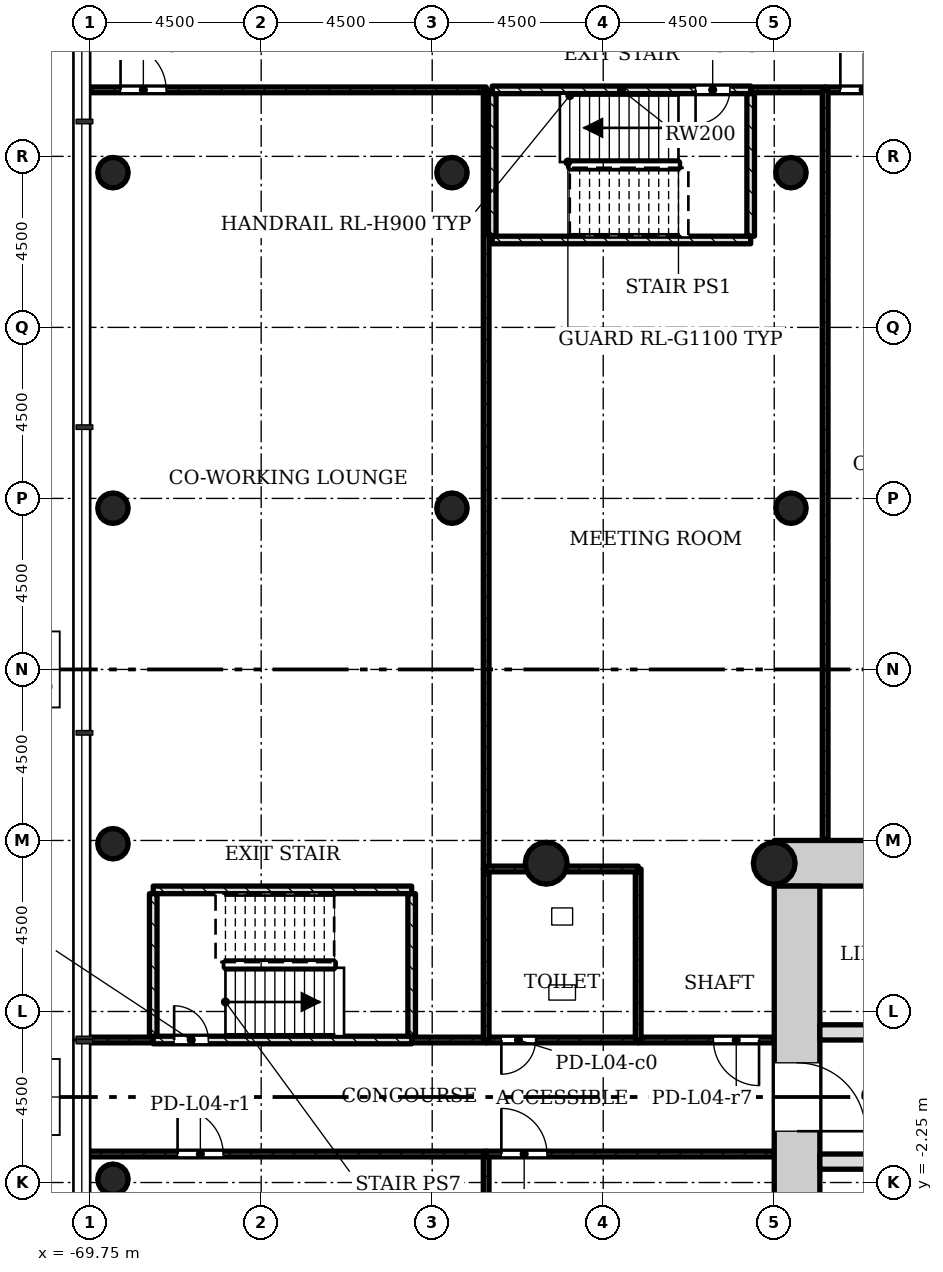
"""IFC4 building model, lengths in metres.
Left out: names, types, materials, properties, quantities, classifications, styles, units other than length and angle.
Written with IfcOpenShell. Run it as: python <this file> out.ifc"""

import sys

from ifc_helpers import new_model, si_unit, direction, frame, frame_2d, origin, origin_2d, place, context, subcontext, project, spatial, rectangle, hollow_circle, extrude, element, fill, save


model = new_model("IFC4")
c1 = context("Model", 3, precision=1e-05, world=origin(), true_north=direction((0.0, 1.0)))
c2 = subcontext(c1, "Body", "Model", "MODEL_VIEW")
j1 = project(units=[si_unit("LENGTHUNIT", "METRE"), si_unit("PLANEANGLEUNIT", "RADIAN")], contexts=[c1])
p1 = place(None, origin())
s1 = spatial("IfcSite", under=j1, at=p1, CompositionType="ELEMENT")
p2 = place(p1, origin())
s2 = spatial("IfcBuilding", under=s1, at=p2, CompositionType="ELEMENT")
p3 = place(p2, frame((0.0, 0.0, 20.0)))
s3 = spatial("IfcBuildingStorey", under=s2, at=p3, CompositionType="ELEMENT", Elevation=20.0)
p4 = place(p3, frame((-43.95, 6.15, 0.0), z_axis=(0.0, 0.0, 1.0), x_axis=(-1.0, 0.0, 0.0)))
e1 = element("IfcWall", 1, at=p4, inside=s3, PredefinedType="SHEAR", context=c2, shape_type="SweptSolid", body=[
    extrude(rectangle(XDim=7.8, YDim=1.2, at=frame_2d((3.9, 0.0))), origin(), (0.0, 0.0, 1.0), 4.5),
])
p5 = place(p3, frame((-51.15, 5.55, 0.0), z_axis=(0.0, 0.0, 1.0), x_axis=(0.0, -1.0, 0.0)))
e2 = element("IfcWall", 2, at=p5, inside=s3, PredefinedType="SHEAR", context=c2, shape_type="SweptSolid", body=[
    extrude(rectangle(XDim=12.3, YDim=1.2, at=frame_2d((6.15, 0.0))), origin(), (0.0, 0.0, 1.0), 4.5),
])
p6 = place(p5, frame((4.65, 0.0, 0.0)))
e3 = element("IfcOpeningElement", 3, at=p6, cuts=e2, PredefinedType="OPENING", context=c2, shape_type="SweptSolid", body=[
    extrude(rectangle(XDim=1.8, YDim=2.1, at=frame_2d((0.9, 1.05))), frame((0.0, 0.61, 0.0), z_axis=(0.0, -1.0, 0.0), x_axis=(1.0, 0.0, 0.0)), (0.0, 0.0, 1.0), 1.22),
])
p7 = place(p3, frame((-50.55, -1.7, 0.0), z_axis=(0.0, 0.0, 1.0), x_axis=(1.0, 0.0, 0.0)))
e4 = element("IfcWall", 4, at=p7, inside=s3, PredefinedType="SHEAR", context=c2, shape_type="SweptSolid", body=[
    extrude(rectangle(XDim=6.6, YDim=0.4, at=frame_2d((3.3, 0.0))), origin(), (0.0, 0.0, 1.0), 4.5),
])
p8 = place(p7, frame((5.25, 0.0, 0.0)))
e5 = element("IfcOpeningElement", 5, at=p8, cuts=e4, PredefinedType="OPENING", context=c2, shape_type="SweptSolid", body=[
    extrude(rectangle(XDim=0.9, YDim=2.1, at=frame_2d((0.45, 1.05))), frame((0.0, 0.21, 0.0), z_axis=(0.0, -1.0, 0.0), x_axis=(1.0, 0.0, 0.0)), (0.0, 0.0, 1.0), 0.42),
])
p9 = place(p3, frame((-50.55, 1.7, 0.0), z_axis=(0.0, 0.0, 1.0), x_axis=(1.0, 0.0, 0.0)))
e6 = element("IfcWall", 6, at=p9, inside=s3, PredefinedType="SHEAR", context=c2, shape_type="SweptSolid", body=[
    extrude(rectangle(XDim=6.6, YDim=0.4, at=frame_2d((3.3, 0.0))), origin(), (0.0, 0.0, 1.0), 4.5),
])
p10 = place(p9, frame((4.95, 0.0, 0.0)))
e7 = element("IfcOpeningElement", 7, at=p10, cuts=e6, PredefinedType="OPENING", context=c2, shape_type="SweptSolid", body=[
    extrude(rectangle(XDim=1.1, YDim=2.1, at=frame_2d((0.55, 1.05))), frame((0.0, 0.21, 0.0), z_axis=(0.0, -1.0, 0.0), x_axis=(1.0, 0.0, 0.0)), (0.0, 0.0, 1.0), 0.42),
])
for number, where, z_axis, x_axis in (
    (8, (-51.75, 6.15, 0.0), (0.0, 0.0, 1.0), (1.0, 0.0, 0.0)),
    (9, (-57.75, 6.15, 0.0), (0.0, 0.0, 1.0), (1.0, 0.0, 0.0)),
):
    element("IfcColumn", number, at=place(p3, frame(where, z_axis=z_axis, x_axis=x_axis)), inside=s3, PredefinedType="COLUMN", context=c2, shape_type="SweptSolid", body=[
        extrude(hollow_circle(Radius=0.55, WallThickness=0.04, at=origin_2d()), origin(), (0.0, 0.0, 1.0), 4.5),
    ])
for number, where, z_axis, x_axis in (
    (10, (-69.15, -2.164, 0.0), (0.0, 0.0, 1.0), (1.0, 0.0, 0.0)),
    (11, (-69.15, 6.664, 0.0), (0.0, 0.0, 1.0), (1.0, 0.0, 0.0)),
    (12, (-69.15, 15.493, 0.0), (0.0, 0.0, 1.0), (1.0, 0.0, 0.0)),
    (13, (-60.23, 15.493, 0.0), (0.0, 0.0, 1.0), (1.0, 0.0, 0.0)),
    (14, (-51.31, 15.493, 0.0), (0.0, 0.0, 1.0), (1.0, 0.0, 0.0)),
    (15, (-69.15, 24.321, 0.0), (0.0, 0.0, 1.0), (1.0, 0.0, 0.0)),
    (16, (-60.23, 24.321, 0.0), (0.0, 0.0, 1.0), (1.0, 0.0, 0.0)),
    (17, (-51.31, 24.321, 0.0), (0.0, 0.0, 1.0), (1.0, 0.0, 0.0)),
):
    element("IfcColumn", number, at=place(p3, frame(where, z_axis=z_axis, x_axis=x_axis)), inside=s3, PredefinedType="COLUMN", context=c2, shape_type="SweptSolid", body=[
        extrude(hollow_circle(Radius=0.4, WallThickness=0.028, at=origin_2d()), origin(), (0.0, 0.0, 1.0), 4.08),
    ])
p11 = place(p3, frame((-69.85, -1.5, 0.0), z_axis=(0.0, 0.0, 1.0), x_axis=(1.0, 0.0, 0.0)))
e18 = element("IfcWall", 18, at=p11, inside=s3, PredefinedType="PARTITIONING", context=c2, shape_type="SweptSolid", body=[
    extrude(rectangle(XDim=10.52, YDim=0.15, at=frame_2d((5.26, 0.0))), origin(), (0.0, 0.0, 1.0), 4.075),
])
p12 = place(p11, frame((2.4, 0.0, 0.0)))
e19 = element("IfcOpeningElement", 19, at=p12, cuts=e18, PredefinedType="OPENING", context=c2, shape_type="SweptSolid", body=[
    extrude(rectangle(XDim=1.2, YDim=2.1, at=frame_2d((0.6, 1.05))), frame((0.0, 0.085, 0.0), z_axis=(0.0, -1.0, 0.0), x_axis=(1.0, 0.0, 0.0)), (0.0, 0.0, 1.0), 0.17),
])
p13 = place(p3, frame((-59.33, -1.5, 0.0), z_axis=(0.0, 0.0, 1.0), x_axis=(0.0, -1.0, 0.0)))
e20 = element("IfcWall", 20, at=p13, inside=s3, PredefinedType="PARTITIONING", context=c2, shape_type="SweptSolid", body=[
    extrude(rectangle(XDim=22.0, YDim=0.15, at=frame_2d((11.0, 0.0))), origin(), (0.0, 0.0, 1.0), 4.075),
])
p14 = place(p3, frame((-59.33, 1.5, 0.0), z_axis=(0.0, 0.0, 1.0), x_axis=(-1.0, 0.0, 0.0)))
e21 = element("IfcWall", 21, at=p14, inside=s3, PredefinedType="PARTITIONING", context=c2, shape_type="SweptSolid", body=[
    extrude(rectangle(XDim=1.96, YDim=0.15, at=frame_2d((0.98, 0.0))), origin(), (0.0, 0.0, 1.0), 4.075),
])
p15 = place(p3, frame((-68.09, 1.5, 0.0), z_axis=(0.0, 0.0, 1.0), x_axis=(-1.0, 0.0, 0.0)))
e22 = element("IfcWall", 22, at=p15, inside=s3, PredefinedType="PARTITIONING", context=c2, shape_type="SweptSolid", body=[
    extrude(rectangle(XDim=1.76, YDim=0.15, at=frame_2d((0.88, 0.0))), origin(), (0.0, 0.0, 1.0), 4.075),
])
p16 = place(p3, frame((-69.85, 26.5, 0.0), z_axis=(0.0, 0.0, 1.0), x_axis=(1.0, 0.0, 0.0)))
e23 = element("IfcWall", 23, at=p16, inside=s3, PredefinedType="PARTITIONING", context=c2, shape_type="SweptSolid", body=[
    extrude(rectangle(XDim=10.52, YDim=0.15, at=frame_2d((5.26, 0.0))), origin(), (0.0, 0.0, 1.0), 4.075),
])
p17 = place(p16, frame((0.9, 0.0, 0.0)))
e24 = element("IfcOpeningElement", 24, at=p17, cuts=e23, PredefinedType="OPENING", context=c2, shape_type="SweptSolid", body=[
    extrude(rectangle(XDim=1.2, YDim=2.1, at=frame_2d((0.6, 1.05))), frame((0.0, 0.085, 0.0), z_axis=(0.0, -1.0, 0.0), x_axis=(1.0, 0.0, 0.0)), (0.0, 0.0, 1.0), 0.17),
])
p18 = place(p3, frame((-59.33, 26.5, 0.0), z_axis=(0.0, 0.0, 1.0), x_axis=(0.0, -1.0, 0.0)))
e25 = element("IfcWall", 25, at=p18, inside=s3, PredefinedType="PARTITIONING", context=c2, shape_type="SweptSolid", body=[
    extrude(rectangle(XDim=20.5, YDim=0.15, at=frame_2d((10.25, 0.0))), origin(), (0.0, 0.0, 1.0), 4.075),
])
p19 = place(p3, frame((-59.33, -1.5, 0.0), z_axis=(0.0, 0.0, 1.0), x_axis=(1.0, 0.0, 0.0)))
e26 = element("IfcWall", 26, at=p19, inside=s3, PredefinedType="PARTITIONING", context=c2, shape_type="SweptSolid", body=[
    extrude(rectangle(XDim=7.58, YDim=0.15, at=frame_2d((3.79, 0.0))), origin(), (0.0, 0.0, 1.0), 4.075),
])
p20 = place(p19, frame((0.4, 0.0, 0.0)))
e27 = element("IfcOpeningElement", 27, at=p20, cuts=e26, PredefinedType="OPENING", context=c2, shape_type="SweptSolid", body=[
    extrude(rectangle(XDim=1.2, YDim=2.1, at=frame_2d((0.6, 1.05))), frame((0.0, 0.085, 0.0), z_axis=(0.0, -1.0, 0.0), x_axis=(1.0, 0.0, 0.0)), (0.0, 0.0, 1.0), 0.17),
])
p21 = place(p3, frame((-51.75, 1.5, 0.0), z_axis=(0.0, 0.0, 1.0), x_axis=(-1.0, 0.0, 0.0)))
e28 = element("IfcWall", 28, at=p21, inside=s3, PredefinedType="PARTITIONING", context=c2, shape_type="SweptSolid", body=[
    extrude(rectangle(XDim=3.58, YDim=0.15, at=frame_2d((1.79, 0.0))), origin(), (0.0, 0.0, 1.0), 4.075),
])
p22 = place(p21, frame((0.4, 0.0, 0.0)))
e29 = element("IfcOpeningElement", 29, at=p22, cuts=e28, PredefinedType="OPENING", context=c2, shape_type="SweptSolid", body=[
    extrude(rectangle(XDim=1.2, YDim=2.1, at=frame_2d((0.6, 1.05))), frame((0.0, 0.085, 0.0), z_axis=(0.0, -1.0, 0.0), x_axis=(1.0, 0.0, 0.0)), (0.0, 0.0, 1.0), 0.17),
])
p23 = place(p3, frame((-52.37, 26.5, 0.0), z_axis=(0.0, 0.0, 1.0), x_axis=(1.0, 0.0, 0.0)))
e30 = element("IfcWall", 30, at=p23, inside=s3, PredefinedType="PARTITIONING", context=c2, shape_type="SweptSolid", body=[
    extrude(rectangle(XDim=1.96, YDim=0.15, at=frame_2d((0.98, 0.0))), origin(), (0.0, 0.0, 1.0), 4.075),
])
p24 = place(p3, frame((-50.41, 26.5, 0.0), z_axis=(0.0, 0.0, 1.0), x_axis=(1.0, 0.0, 0.0)))
e31 = element("IfcWall", 31, at=p24, inside=s3, PredefinedType="PARTITIONING", context=c2, shape_type="SweptSolid", body=[
    extrude(rectangle(XDim=8.92, YDim=0.15, at=frame_2d((4.46, 0.0))), origin(), (0.0, 0.0, 1.0), 4.075),
])
p25 = place(p24, frame((0.4, 0.0, 0.0)))
e32 = element("IfcOpeningElement", 32, at=p25, cuts=e31, PredefinedType="OPENING", context=c2, shape_type="SweptSolid", body=[
    extrude(rectangle(XDim=1.2, YDim=2.1, at=frame_2d((0.6, 1.05))), frame((0.0, 0.085, 0.0), z_axis=(0.0, -1.0, 0.0), x_axis=(1.0, 0.0, 0.0)), (0.0, 0.0, 1.0), 0.17),
])
p26 = place(p3, frame((-50.41, 6.75, 0.0), z_axis=(0.0, 0.0, 1.0), x_axis=(0.0, 1.0, 0.0)))
e33 = element("IfcWall", 33, at=p26, inside=s3, PredefinedType="PARTITIONING", context=c2, shape_type="SweptSolid", body=[
    extrude(rectangle(XDim=19.75, YDim=0.15, at=frame_2d((9.875, 0.0))), origin(), (0.0, 0.0, 1.0), 4.075),
])
p27 = place(p3, frame((-59.33, 1.5, 0.0), z_axis=(0.0, 0.0, 1.0), x_axis=(1.0, 0.0, 0.0)))
e34 = element("IfcWall", 34, at=p27, inside=s3, PredefinedType="PARTITIONING", context=c2, shape_type="SweptSolid", body=[
    extrude(rectangle(XDim=4.0, YDim=0.15, at=frame_2d((2.0, 0.0))), origin(), (0.0, 0.0, 1.0), 4.075),
])
p28 = place(p27, frame((0.4, 0.0, 0.0)))
e35 = element("IfcOpeningElement", 35, at=p28, cuts=e34, PredefinedType="OPENING", context=c2, shape_type="SweptSolid", body=[
    extrude(rectangle(XDim=0.9, YDim=2.1, at=frame_2d((0.45, 1.05))), frame((0.0, 0.085, 0.0), z_axis=(0.0, -1.0, 0.0), x_axis=(1.0, 0.0, 0.0)), (0.0, 0.0, 1.0), 0.17),
])
for number, where, z_axis, x_axis in (
    (36, (-59.33, 6.0, 0.0), (0.0, 0.0, 1.0), (0.0, -1.0, 0.0)),
    (37, (-55.33, 1.5, 0.0), (0.0, 0.0, 1.0), (0.0, 1.0, 0.0)),
):
    element("IfcWall", number, at=place(p3, frame(where, z_axis=z_axis, x_axis=x_axis)), inside=s3, PredefinedType="PARTITIONING", context=c2, shape_type="SweptSolid", body=[
        extrude(rectangle(XDim=4.5, YDim=0.15, at=frame_2d((2.25, 0.0))), origin(), (0.0, 0.0, 1.0), 4.075),
    ])
p29 = place(p3, frame((-55.33, 6.0, 0.0), z_axis=(0.0, 0.0, 1.0), x_axis=(-1.0, 0.0, 0.0)))
e38 = element("IfcWall", 38, at=p29, inside=s3, PredefinedType="PARTITIONING", context=c2, shape_type="SweptSolid", body=[
    extrude(rectangle(XDim=2.42, YDim=0.15, at=frame_2d((1.21, 0.0))), origin(), (0.0, 0.0, 1.0), 3.65),
])
p30 = place(p3, frame((-57.75, 6.0, 0.0), z_axis=(0.0, 0.0, 1.0), x_axis=(-1.0, 0.0, 0.0)))
e39 = element("IfcWall", 39, at=p30, inside=s3, PredefinedType="PARTITIONING", context=c2, shape_type="SweptSolid", body=[
    extrude(rectangle(XDim=1.58, YDim=0.15, at=frame_2d((0.79, 0.0))), origin(), (0.0, 0.0, 1.0), 4.075),
])
p31 = place(p3, frame((-59.17, 26.5, 0.0), z_axis=(0.0, 0.0, 1.0), x_axis=(1.0, 0.0, 0.0)))
e40 = element("IfcWall", 40, at=p31, inside=s3, PredefinedType="SHEAR", context=c2, shape_type="SweptSolid", body=[
    extrude(rectangle(XDim=6.8, YDim=0.2, at=frame_2d((3.4, 0.0))), origin(), (0.0, 0.0, 1.0), 4.075),
])
p32 = place(p31, frame((5.35, 0.0, 0.0)))
e41 = element("IfcOpeningElement", 41, at=p32, cuts=e40, PredefinedType="OPENING", context=c2, shape_type="SweptSolid", body=[
    extrude(rectangle(XDim=0.9, YDim=2.1, at=frame_2d((0.45, 1.05))), frame((0.0, 0.11, 0.0), z_axis=(0.0, -1.0, 0.0), x_axis=(1.0, 0.0, 0.0)), (0.0, 0.0, 1.0), 0.22),
])
p33 = place(p3, frame((-59.17, 22.55, 0.0), z_axis=(0.0, 0.0, 1.0), x_axis=(1.0, 0.0, 0.0)))
e42 = element("IfcWall", 42, at=p33, inside=s3, PredefinedType="SHEAR", context=c2, shape_type="SweptSolid", body=[
    extrude(rectangle(XDim=6.8, YDim=0.2, at=frame_2d((3.4, 0.0))), origin(), (0.0, 0.0, 1.0), 4.075),
])
for number, where, z_axis, x_axis in (
    (43, (-59.17, 22.65, 0.0), (0.0, 0.0, 1.0), (0.0, 1.0, 0.0)),
    (44, (-52.37, 22.65, 0.0), (0.0, 0.0, 1.0), (0.0, 1.0, 0.0)),
):
    element("IfcWall", number, at=place(p3, frame(where, z_axis=z_axis, x_axis=x_axis)), inside=s3, PredefinedType="SHEAR", context=c2, shape_type="SweptSolid", body=[
        extrude(rectangle(XDim=3.75, YDim=0.2, at=frame_2d((1.875, 0.0))), origin(), (0.0, 0.0, 1.0), 4.075),
    ])
p34 = place(p3, frame((-68.09, 1.5, 0.0), z_axis=(0.0, 0.0, 1.0), x_axis=(1.0, 0.0, 0.0)))
e45 = element("IfcWall", 45, at=p34, inside=s3, PredefinedType="SHEAR", context=c2, shape_type="SweptSolid", body=[
    extrude(rectangle(XDim=6.8, YDim=0.2, at=frame_2d((3.4, 0.0))), origin(), (0.0, 0.0, 1.0), 4.075),
])
p35 = place(p34, frame((0.55, 0.0, 0.0)))
e46 = element("IfcOpeningElement", 46, at=p35, cuts=e45, PredefinedType="OPENING", context=c2, shape_type="SweptSolid", body=[
    extrude(rectangle(XDim=0.9, YDim=2.1, at=frame_2d((0.45, 1.05))), frame((0.0, 0.11, 0.0), z_axis=(0.0, -1.0, 0.0), x_axis=(1.0, 0.0, 0.0)), (0.0, 0.0, 1.0), 0.22),
])
p36 = place(p3, frame((-68.09, 5.45, 0.0), z_axis=(0.0, 0.0, 1.0), x_axis=(1.0, 0.0, 0.0)))
e47 = element("IfcWall", 47, at=p36, inside=s3, PredefinedType="SHEAR", context=c2, shape_type="SweptSolid", body=[
    extrude(rectangle(XDim=6.8, YDim=0.2, at=frame_2d((3.4, 0.0))), origin(), (0.0, 0.0, 1.0), 4.075),
])
for number, where, z_axis, x_axis in (
    (48, (-68.09, 1.6, 0.0), (0.0, 0.0, 1.0), (0.0, 1.0, 0.0)),
    (49, (-61.29, 1.6, 0.0), (0.0, 0.0, 1.0), (0.0, 1.0, 0.0)),
):
    element("IfcWall", number, at=place(p3, frame(where, z_axis=z_axis, x_axis=x_axis)), inside=s3, PredefinedType="SHEAR", context=c2, shape_type="SweptSolid", body=[
        extrude(rectangle(XDim=3.75, YDim=0.2, at=frame_2d((1.875, 0.0))), origin(), (0.0, 0.0, 1.0), 4.075),
    ])
p37 = place(p12, origin())
e50 = element("IfcDoor", 50, at=p37, inside=s3, OperationType="SINGLE_SWING_RIGHT", PredefinedType="DOOR", context=c2, shape_type="SweptSolid", body=[
    extrude(rectangle(XDim=1.2, YDim=2.1, at=frame_2d((0.6, 1.05))), frame((0.0, 0.025, 0.0), z_axis=(0.0, -1.0, 0.0), x_axis=(1.0, 0.0, 0.0)), (0.0, 0.0, 1.0), 0.05),
])
fill(e19, e50)
p38 = place(p17, origin())
e51 = element("IfcDoor", 51, at=p38, inside=s3, OperationType="SINGLE_SWING_RIGHT", PredefinedType="DOOR", context=c2, shape_type="SweptSolid", body=[
    extrude(rectangle(XDim=1.2, YDim=2.1, at=frame_2d((0.6, 1.05))), frame((0.0, 0.025, 0.0), z_axis=(0.0, -1.0, 0.0), x_axis=(1.0, 0.0, 0.0)), (0.0, 0.0, 1.0), 0.05),
])
fill(e24, e51)
p39 = place(p20, origin())
e52 = element("IfcDoor", 52, at=p39, inside=s3, OperationType="SINGLE_SWING_RIGHT", PredefinedType="DOOR", context=c2, shape_type="SweptSolid", body=[
    extrude(rectangle(XDim=1.2, YDim=2.1, at=frame_2d((0.6, 1.05))), frame((0.0, 0.025, 0.0), z_axis=(0.0, -1.0, 0.0), x_axis=(1.0, 0.0, 0.0)), (0.0, 0.0, 1.0), 0.05),
])
fill(e27, e52)
p40 = place(p22, origin())
e53 = element("IfcDoor", 53, at=p40, inside=s3, OperationType="SINGLE_SWING_RIGHT", PredefinedType="DOOR", context=c2, shape_type="SweptSolid", body=[
    extrude(rectangle(XDim=1.2, YDim=2.1, at=frame_2d((0.6, 1.05))), frame((0.0, 0.025, 0.0), z_axis=(0.0, -1.0, 0.0), x_axis=(1.0, 0.0, 0.0)), (0.0, 0.0, 1.0), 0.05),
])
fill(e29, e53)
p41 = place(p25, origin())
e54 = element("IfcDoor", 54, at=p41, inside=s3, OperationType="SINGLE_SWING_RIGHT", PredefinedType="DOOR", context=c2, shape_type="SweptSolid", body=[
    extrude(rectangle(XDim=1.2, YDim=2.1, at=frame_2d((0.6, 1.05))), frame((0.0, 0.025, 0.0), z_axis=(0.0, -1.0, 0.0), x_axis=(1.0, 0.0, 0.0)), (0.0, 0.0, 1.0), 0.05),
])
fill(e32, e54)
p42 = place(p28, origin())
e55 = element("IfcDoor", 55, at=p42, inside=s3, OperationType="SINGLE_SWING_LEFT", PredefinedType="DOOR", context=c2, shape_type="SweptSolid", body=[
    extrude(rectangle(XDim=0.9, YDim=2.1, at=frame_2d((0.45, 1.05))), frame((0.0, 0.025, 0.0), z_axis=(0.0, -1.0, 0.0), x_axis=(1.0, 0.0, 0.0)), (0.0, 0.0, 1.0), 0.05),
])
fill(e35, e55)
p43 = place(p32, origin())
e56 = element("IfcDoor", 56, at=p43, inside=s3, OperationType="SINGLE_SWING_LEFT", PredefinedType="DOOR", context=c2, shape_type="SweptSolid", body=[
    extrude(rectangle(XDim=0.9, YDim=2.1, at=frame_2d((0.45, 1.05))), frame((0.0, 0.025, 0.0), z_axis=(0.0, -1.0, 0.0), x_axis=(1.0, 0.0, 0.0)), (0.0, 0.0, 1.0), 0.05),
])
fill(e41, e56)
p44 = place(p35, origin())
e57 = element("IfcDoor", 57, at=p44, inside=s3, OperationType="SINGLE_SWING_RIGHT", PredefinedType="DOOR", context=c2, shape_type="SweptSolid", body=[
    extrude(rectangle(XDim=0.9, YDim=2.1, at=frame_2d((0.45, 1.05))), frame((0.0, 0.025, 0.0), z_axis=(0.0, -1.0, 0.0), x_axis=(1.0, 0.0, 0.0)), (0.0, 0.0, 1.0), 0.05),
])
fill(e46, e57)
p45 = place(p6, origin())
e58 = element("IfcDoor", 58, at=p45, inside=s3, OperationType="SINGLE_SWING_LEFT", PredefinedType="DOOR", context=c2, shape_type="SweptSolid", body=[
    extrude(rectangle(XDim=1.8, YDim=2.1, at=frame_2d((0.9, 1.05))), frame((0.0, 0.025, 0.0), z_axis=(0.0, -1.0, 0.0), x_axis=(1.0, 0.0, 0.0)), (0.0, 0.0, 1.0), 0.05),
])
fill(e3, e58)
save(model, sys.argv[1])
